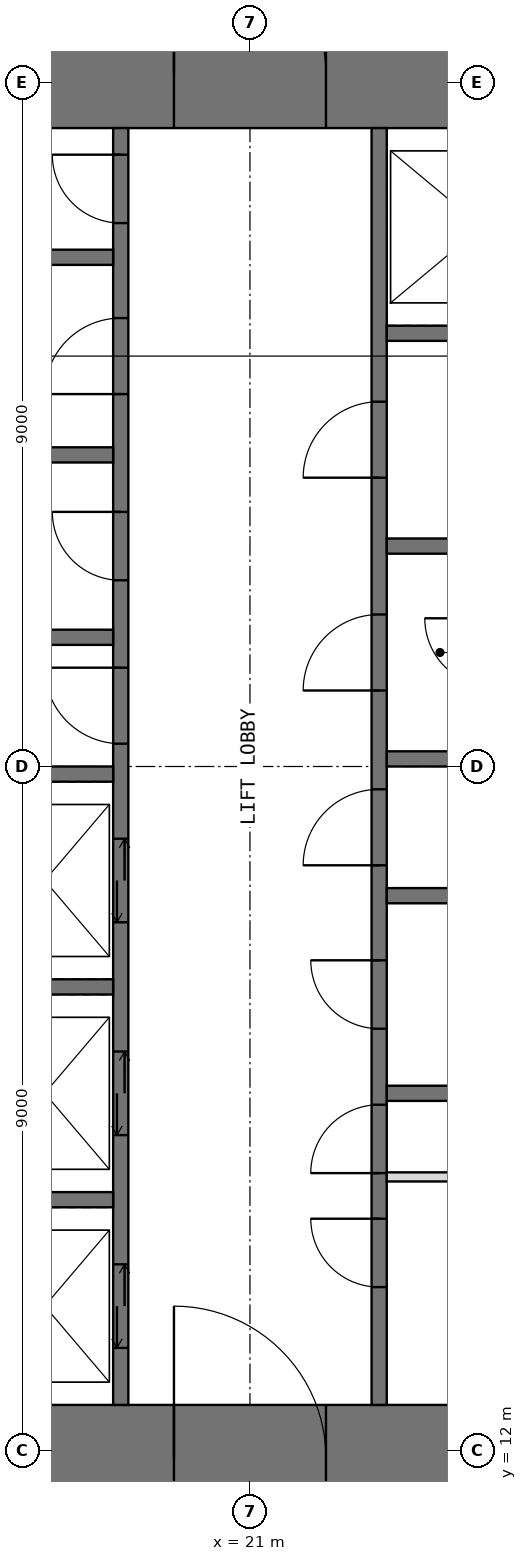
"""IFC4 building model, lengths in metres.
Left out: names, types, materials, properties, quantities, classifications, styles, units other than length and angle.
Written with IfcOpenShell. Run it as: python <this file> out.ifc"""

import sys

from ifc_helpers import new_model, si_unit, direction, frame, frame_2d, origin, place, context, subcontext, project, spatial, rectangle, extrude, element, fill, save


model = new_model("IFC4")
c1 = context("Model", 3, precision=1e-05, world=origin(), true_north=direction((0.0, 1.0)))
c2 = subcontext(c1, "Body", "Model", "MODEL_VIEW")
j1 = project(units=[si_unit("LENGTHUNIT", "METRE"), si_unit("PLANEANGLEUNIT", "RADIAN")], contexts=[c1])
p1 = place(None, origin())
s1 = spatial("IfcSite", under=j1, at=p1, CompositionType="ELEMENT")
p2 = place(p1, origin())
s2 = spatial("IfcBuilding", under=s1, at=p2, CompositionType="ELEMENT")
p3 = place(p2, frame((0.0, 0.0, 206.5)))
s3 = spatial("IfcBuildingStorey", under=s2, at=p3, CompositionType="ELEMENT", Elevation=206.5)
p4 = place(p3, frame((11.2, 11.9, -0.05), z_axis=(0.0, 0.0, 1.0), x_axis=(1.0, 0.0, 0.0)))
e1 = element("IfcWall", 1, at=p4, inside=s3, PredefinedType="SHEAR", context=c2, shape_type="SweptSolid", body=[
    extrude(rectangle(XDim=19.6, YDim=1.4, at=frame_2d((9.8, 0.0))), origin(), (0.0, 0.0, 1.0), 4.0),
])
p5 = place(p4, frame((8.8, 0.0, 0.05)))
e2 = element("IfcOpeningElement", 2, at=p5, cuts=e1, PredefinedType="OPENING", context=c2, shape_type="SweptSolid", body=[
    extrude(rectangle(XDim=2.0, YDim=2.2, at=frame_2d((1.0, 1.1))), frame((0.0, 0.71, 0.0), z_axis=(0.0, -1.0, 0.0), x_axis=(1.0, 0.0, 0.0)), (0.0, 0.0, 1.0), 1.42),
])
p6 = place(p3, frame((11.2, 30.1, -0.05), z_axis=(0.0, 0.0, 1.0), x_axis=(1.0, 0.0, 0.0)))
e3 = element("IfcWall", 3, at=p6, inside=s3, PredefinedType="SHEAR", context=c2, shape_type="SweptSolid", body=[
    extrude(rectangle(XDim=19.6, YDim=1.4, at=frame_2d((9.8, 0.0))), origin(), (0.0, 0.0, 1.0), 4.0),
])
p7 = place(p6, frame((8.8, 0.0, 0.05)))
e4 = element("IfcOpeningElement", 4, at=p7, cuts=e3, PredefinedType="OPENING", context=c2, shape_type="SweptSolid", body=[
    extrude(rectangle(XDim=2.0, YDim=2.2, at=frame_2d((1.0, 1.1))), frame((0.0, 0.71, 0.0), z_axis=(0.0, -1.0, 0.0), x_axis=(1.0, 0.0, 0.0)), (0.0, 0.0, 1.0), 1.42),
])
p8 = place(p3, frame((19.3, 12.6, -0.05), z_axis=(0.0, 0.0, 1.0), x_axis=(0.0, 1.0, 0.0)))
e5 = element("IfcWall", 5, at=p8, inside=s3, PredefinedType="SHEAR", context=c2, shape_type="SweptSolid", body=[
    extrude(rectangle(XDim=16.8, YDim=0.2, at=frame_2d((8.4, 0.0))), origin(), (0.0, 0.0, 1.0), 4.0),
])
p9 = place(p8, frame((8.7, 0.0, 0.05)))
e6 = element("IfcOpeningElement", 6, at=p9, cuts=e5, PredefinedType="OPENING", context=c2, shape_type="SweptSolid", body=[
    extrude(rectangle(XDim=1.0, YDim=2.2, at=frame_2d((0.5, 1.1))), frame((0.0, 0.11, 0.0), z_axis=(0.0, -1.0, 0.0), x_axis=(1.0, 0.0, 0.0)), (0.0, 0.0, 1.0), 0.22),
])
p10 = place(p8, frame((10.85, 0.0, 0.05)))
e7 = element("IfcOpeningElement", 7, at=p10, cuts=e5, PredefinedType="OPENING", context=c2, shape_type="SweptSolid", body=[
    extrude(rectangle(XDim=0.9, YDim=2.2, at=frame_2d((0.45, 1.1))), frame((0.0, 0.11, 0.0), z_axis=(0.0, -1.0, 0.0), x_axis=(1.0, 0.0, 0.0)), (0.0, 0.0, 1.0), 0.22),
])
p11 = place(p8, frame((13.3, 0.0, 0.05)))
e8 = element("IfcOpeningElement", 8, at=p11, cuts=e5, PredefinedType="OPENING", context=c2, shape_type="SweptSolid", body=[
    extrude(rectangle(XDim=1.0, YDim=2.2, at=frame_2d((0.5, 1.1))), frame((0.0, 0.11, 0.0), z_axis=(0.0, -1.0, 0.0), x_axis=(1.0, 0.0, 0.0)), (0.0, 0.0, 1.0), 0.22),
])
p12 = place(p8, frame((15.55, 0.0, 0.05)))
e9 = element("IfcOpeningElement", 9, at=p12, cuts=e5, PredefinedType="OPENING", context=c2, shape_type="SweptSolid", body=[
    extrude(rectangle(XDim=0.9, YDim=2.2, at=frame_2d((0.45, 1.1))), frame((0.0, 0.11, 0.0), z_axis=(0.0, -1.0, 0.0), x_axis=(1.0, 0.0, 0.0)), (0.0, 0.0, 1.0), 0.22),
])
p13 = place(p8, frame((0.75, 0.0, 0.05)))
e10 = element("IfcOpeningElement", 10, at=p13, cuts=e5, PredefinedType="OPENING", context=c2, shape_type="SweptSolid", body=[
    extrude(rectangle(XDim=1.1, YDim=2.2, at=frame_2d((0.55, 1.1))), frame((0.0, 0.11, 0.0), z_axis=(0.0, -1.0, 0.0), x_axis=(1.0, 0.0, 0.0)), (0.0, 0.0, 1.0), 0.22),
])
p14 = place(p8, frame((3.55, 0.0, 0.05)))
e11 = element("IfcOpeningElement", 11, at=p14, cuts=e5, PredefinedType="OPENING", context=c2, shape_type="SweptSolid", body=[
    extrude(rectangle(XDim=1.1, YDim=2.2, at=frame_2d((0.55, 1.1))), frame((0.0, 0.11, 0.0), z_axis=(0.0, -1.0, 0.0), x_axis=(1.0, 0.0, 0.0)), (0.0, 0.0, 1.0), 0.22),
])
p15 = place(p8, frame((6.35, 0.0, 0.05)))
e12 = element("IfcOpeningElement", 12, at=p15, cuts=e5, PredefinedType="OPENING", context=c2, shape_type="SweptSolid", body=[
    extrude(rectangle(XDim=1.1, YDim=2.2, at=frame_2d((0.55, 1.1))), frame((0.0, 0.11, 0.0), z_axis=(0.0, -1.0, 0.0), x_axis=(1.0, 0.0, 0.0)), (0.0, 0.0, 1.0), 0.22),
])
p16 = place(p3, frame((22.7, 12.6, -0.05), z_axis=(0.0, 0.0, 1.0), x_axis=(0.0, 1.0, 0.0)))
e13 = element("IfcWall", 13, at=p16, inside=s3, PredefinedType="SHEAR", context=c2, shape_type="SweptSolid", body=[
    extrude(rectangle(XDim=16.8, YDim=0.2, at=frame_2d((8.4, 0.0))), origin(), (0.0, 0.0, 1.0), 4.0),
])
p17 = place(p16, frame((3.05, 0.0, 0.05)))
e14 = element("IfcOpeningElement", 14, at=p17, cuts=e13, PredefinedType="OPENING", context=c2, shape_type="SweptSolid", body=[
    extrude(rectangle(XDim=0.9, YDim=2.2, at=frame_2d((0.45, 1.1))), frame((0.0, 0.11, 0.0), z_axis=(0.0, -1.0, 0.0), x_axis=(1.0, 0.0, 0.0)), (0.0, 0.0, 1.0), 0.22),
])
p18 = place(p16, frame((7.1, 0.0, 0.05)))
e15 = element("IfcOpeningElement", 15, at=p18, cuts=e13, PredefinedType="OPENING", context=c2, shape_type="SweptSolid", body=[
    extrude(rectangle(XDim=1.0, YDim=2.2, at=frame_2d((0.5, 1.1))), frame((0.0, 0.11, 0.0), z_axis=(0.0, -1.0, 0.0), x_axis=(1.0, 0.0, 0.0)), (0.0, 0.0, 1.0), 0.22),
])
p19 = place(p16, frame((1.55, 0.0, 0.05)))
e16 = element("IfcOpeningElement", 16, at=p19, cuts=e13, PredefinedType="OPENING", context=c2, shape_type="SweptSolid", body=[
    extrude(rectangle(XDim=0.9, YDim=2.2, at=frame_2d((0.45, 1.1))), frame((0.0, 0.11, 0.0), z_axis=(0.0, -1.0, 0.0), x_axis=(1.0, 0.0, 0.0)), (0.0, 0.0, 1.0), 0.22),
])
p20 = place(p16, frame((4.95, 0.0, 0.05)))
e17 = element("IfcOpeningElement", 17, at=p20, cuts=e13, PredefinedType="OPENING", context=c2, shape_type="SweptSolid", body=[
    extrude(rectangle(XDim=0.9, YDim=2.2, at=frame_2d((0.45, 1.1))), frame((0.0, 0.11, 0.0), z_axis=(0.0, -1.0, 0.0), x_axis=(1.0, 0.0, 0.0)), (0.0, 0.0, 1.0), 0.22),
])
p21 = place(p16, frame((9.4, 0.0, 0.05)))
e18 = element("IfcOpeningElement", 18, at=p21, cuts=e13, PredefinedType="OPENING", context=c2, shape_type="SweptSolid", body=[
    extrude(rectangle(XDim=1.0, YDim=2.2, at=frame_2d((0.5, 1.1))), frame((0.0, 0.11, 0.0), z_axis=(0.0, -1.0, 0.0), x_axis=(1.0, 0.0, 0.0)), (0.0, 0.0, 1.0), 0.22),
])
p22 = place(p16, frame((12.2, 0.0, 0.05)))
e19 = element("IfcOpeningElement", 19, at=p22, cuts=e13, PredefinedType="OPENING", context=c2, shape_type="SweptSolid", body=[
    extrude(rectangle(XDim=1.0, YDim=2.2, at=frame_2d((0.5, 1.1))), frame((0.0, 0.11, 0.0), z_axis=(0.0, -1.0, 0.0), x_axis=(1.0, 0.0, 0.0)), (0.0, 0.0, 1.0), 0.22),
])
for number, where, z_axis, x_axis in (
    (20, (16.0, 15.3, -0.05), (0.0, 0.0, 1.0), (1.0, 0.0, 0.0)),
    (21, (16.0, 18.1, -0.05), (0.0, 0.0, 1.0), (1.0, 0.0, 0.0)),
    (22, (16.0, 20.9, -0.05), (0.0, 0.0, 1.0), (1.0, 0.0, 0.0)),
    (23, (16.0, 22.7, -0.05), (0.0, 0.0, 1.0), (1.0, 0.0, 0.0)),
    (24, (16.0, 25.1, -0.05), (0.0, 0.0, 1.0), (1.0, 0.0, 0.0)),
    (25, (16.0, 27.7, -0.05), (0.0, 0.0, 1.0), (1.0, 0.0, 0.0)),
    (26, (22.8, 16.7, -0.05), (0.0, 0.0, 1.0), (1.0, 0.0, 0.0)),
    (27, (22.8, 19.3, -0.05), (0.0, 0.0, 1.0), (1.0, 0.0, 0.0)),
    (28, (22.8, 21.1, -0.05), (0.0, 0.0, 1.0), (1.0, 0.0, 0.0)),
    (29, (22.8, 23.9, -0.05), (0.0, 0.0, 1.0), (1.0, 0.0, 0.0)),
    (30, (22.8, 26.7, -0.05), (0.0, 0.0, 1.0), (1.0, 0.0, 0.0)),
):
    element("IfcWall", number, at=place(p3, frame(where, z_axis=z_axis, x_axis=x_axis)), inside=s3, PredefinedType="SHEAR", context=c2, shape_type="SweptSolid", body=[
        extrude(rectangle(XDim=3.2, YDim=0.2, at=frame_2d((1.6, 0.0))), origin(), (0.0, 0.0, 1.0), 4.0),
    ])
p23 = place(p3, frame((22.8, 15.6, 0.0), z_axis=(0.0, 0.0, 1.0), x_axis=(1.0, 0.0, 0.0)))
e31 = element("IfcWall", 31, at=p23, inside=s3, PredefinedType="PARTITIONING", context=c2, shape_type="SweptSolid", body=[
    extrude(rectangle(XDim=3.2, YDim=0.12, at=frame_2d((1.6, 0.0))), origin(), (0.0, 0.0, 1.0), 3.75),
])
p24 = place(p5, origin())
e32 = element("IfcDoor", 32, at=p24, inside=s3, OperationType="DOUBLE_DOOR_SINGLE_SWING", PredefinedType="DOOR", context=c2, shape_type="SweptSolid", body=[
    extrude(rectangle(XDim=2.0, YDim=2.2, at=frame_2d((1.0, 1.1))), frame((0.0, 0.025, 0.0), z_axis=(0.0, -1.0, 0.0), x_axis=(1.0, 0.0, 0.0)), (0.0, 0.0, 1.0), 0.05),
])
fill(e2, e32)
p25 = place(p7, origin())
e33 = element("IfcDoor", 33, at=p25, inside=s3, OperationType="DOUBLE_DOOR_SINGLE_SWING", PredefinedType="DOOR", context=c2, shape_type="SweptSolid", body=[
    extrude(rectangle(XDim=2.0, YDim=2.2, at=frame_2d((1.0, 1.1))), frame((0.0, 0.025, 0.0), z_axis=(0.0, -1.0, 0.0), x_axis=(1.0, 0.0, 0.0)), (0.0, 0.0, 1.0), 0.05),
])
fill(e4, e33)
p26 = place(p17, origin())
e34 = element("IfcDoor", 34, at=p26, inside=s3, OperationType="SINGLE_SWING_LEFT", PredefinedType="DOOR", context=c2, shape_type="SweptSolid", body=[
    extrude(rectangle(XDim=0.9, YDim=2.2, at=frame_2d((0.45, 1.1))), frame((0.0, 0.025, 0.0), z_axis=(0.0, -1.0, 0.0), x_axis=(1.0, 0.0, 0.0)), (0.0, 0.0, 1.0), 0.05),
])
fill(e14, e34)
p27 = place(p9, origin())
e35 = element("IfcDoor", 35, at=p27, inside=s3, OperationType="SINGLE_SWING_RIGHT", PredefinedType="DOOR", context=c2, shape_type="SweptSolid", body=[
    extrude(rectangle(XDim=1.0, YDim=2.2, at=frame_2d((0.5, 1.1))), frame((0.0, 0.025, 0.0), z_axis=(0.0, -1.0, 0.0), x_axis=(1.0, 0.0, 0.0)), (0.0, 0.0, 1.0), 0.05),
])
fill(e6, e35)
p28 = place(p18, origin())
e36 = element("IfcDoor", 36, at=p28, inside=s3, OperationType="SINGLE_SWING_LEFT", PredefinedType="DOOR", context=c2, shape_type="SweptSolid", body=[
    extrude(rectangle(XDim=1.0, YDim=2.2, at=frame_2d((0.5, 1.1))), frame((0.0, 0.025, 0.0), z_axis=(0.0, -1.0, 0.0), x_axis=(1.0, 0.0, 0.0)), (0.0, 0.0, 1.0), 0.05),
])
fill(e15, e36)
p29 = place(p10, origin())
e37 = element("IfcDoor", 37, at=p29, inside=s3, OperationType="SINGLE_SWING_RIGHT", PredefinedType="DOOR", context=c2, shape_type="SweptSolid", body=[
    extrude(rectangle(XDim=0.9, YDim=2.2, at=frame_2d((0.45, 1.1))), frame((0.0, 0.025, 0.0), z_axis=(0.0, -1.0, 0.0), x_axis=(1.0, 0.0, 0.0)), (0.0, 0.0, 1.0), 0.05),
])
fill(e7, e37)
p30 = place(p11, origin())
e38 = element("IfcDoor", 38, at=p30, inside=s3, OperationType="SINGLE_SWING_LEFT", PredefinedType="DOOR", context=c2, shape_type="SweptSolid", body=[
    extrude(rectangle(XDim=1.0, YDim=2.2, at=frame_2d((0.5, 1.1))), frame((0.0, 0.025, 0.0), z_axis=(0.0, -1.0, 0.0), x_axis=(1.0, 0.0, 0.0)), (0.0, 0.0, 1.0), 0.05),
])
fill(e8, e38)
p31 = place(p12, origin())
e39 = element("IfcDoor", 39, at=p31, inside=s3, OperationType="SINGLE_SWING_RIGHT", PredefinedType="DOOR", context=c2, shape_type="SweptSolid", body=[
    extrude(rectangle(XDim=0.9, YDim=2.2, at=frame_2d((0.45, 1.1))), frame((0.0, 0.025, 0.0), z_axis=(0.0, -1.0, 0.0), x_axis=(1.0, 0.0, 0.0)), (0.0, 0.0, 1.0), 0.05),
])
fill(e9, e39)
p32 = place(p19, origin())
e40 = element("IfcDoor", 40, at=p32, inside=s3, OperationType="SINGLE_SWING_RIGHT", PredefinedType="DOOR", context=c2, shape_type="SweptSolid", body=[
    extrude(rectangle(XDim=0.9, YDim=2.2, at=frame_2d((0.45, 1.1))), frame((0.0, 0.025, 0.0), z_axis=(0.0, -1.0, 0.0), x_axis=(1.0, 0.0, 0.0)), (0.0, 0.0, 1.0), 0.05),
])
fill(e16, e40)
p33 = place(p20, origin())
e41 = element("IfcDoor", 41, at=p33, inside=s3, OperationType="SINGLE_SWING_RIGHT", PredefinedType="DOOR", context=c2, shape_type="SweptSolid", body=[
    extrude(rectangle(XDim=0.9, YDim=2.2, at=frame_2d((0.45, 1.1))), frame((0.0, 0.025, 0.0), z_axis=(0.0, -1.0, 0.0), x_axis=(1.0, 0.0, 0.0)), (0.0, 0.0, 1.0), 0.05),
])
fill(e17, e41)
p34 = place(p21, origin())
e42 = element("IfcDoor", 42, at=p34, inside=s3, OperationType="SINGLE_SWING_LEFT", PredefinedType="DOOR", context=c2, shape_type="SweptSolid", body=[
    extrude(rectangle(XDim=1.0, YDim=2.2, at=frame_2d((0.5, 1.1))), frame((0.0, 0.025, 0.0), z_axis=(0.0, -1.0, 0.0), x_axis=(1.0, 0.0, 0.0)), (0.0, 0.0, 1.0), 0.05),
])
fill(e18, e42)
p35 = place(p22, origin())
e43 = element("IfcDoor", 43, at=p35, inside=s3, OperationType="SINGLE_SWING_LEFT", PredefinedType="DOOR", context=c2, shape_type="SweptSolid", body=[
    extrude(rectangle(XDim=1.0, YDim=2.2, at=frame_2d((0.5, 1.1))), frame((0.0, 0.025, 0.0), z_axis=(0.0, -1.0, 0.0), x_axis=(1.0, 0.0, 0.0)), (0.0, 0.0, 1.0), 0.05),
])
fill(e19, e43)
p36 = place(p13, origin())
e44 = element("IfcDoor", 44, at=p36, inside=s3, OperationType="DOUBLE_DOOR_SLIDING", PredefinedType="DOOR", context=c2, shape_type="SweptSolid", body=[
    extrude(rectangle(XDim=1.1, YDim=2.2, at=frame_2d((0.55, 1.1))), frame((0.0, 0.025, 0.0), z_axis=(0.0, -1.0, 0.0), x_axis=(1.0, 0.0, 0.0)), (0.0, 0.0, 1.0), 0.05),
])
fill(e10, e44)
p37 = place(p14, origin())
e45 = element("IfcDoor", 45, at=p37, inside=s3, OperationType="DOUBLE_DOOR_SLIDING", PredefinedType="DOOR", context=c2, shape_type="SweptSolid", body=[
    extrude(rectangle(XDim=1.1, YDim=2.2, at=frame_2d((0.55, 1.1))), frame((0.0, 0.025, 0.0), z_axis=(0.0, -1.0, 0.0), x_axis=(1.0, 0.0, 0.0)), (0.0, 0.0, 1.0), 0.05),
])
fill(e11, e45)
p38 = place(p15, origin())
e46 = element("IfcDoor", 46, at=p38, inside=s3, OperationType="DOUBLE_DOOR_SLIDING", PredefinedType="DOOR", context=c2, shape_type="SweptSolid", body=[
    extrude(rectangle(XDim=1.1, YDim=2.2, at=frame_2d((0.55, 1.1))), frame((0.0, 0.025, 0.0), z_axis=(0.0, -1.0, 0.0), x_axis=(1.0, 0.0, 0.0)), (0.0, 0.0, 1.0), 0.05),
])
fill(e12, e46)
save(model, sys.argv[1])
